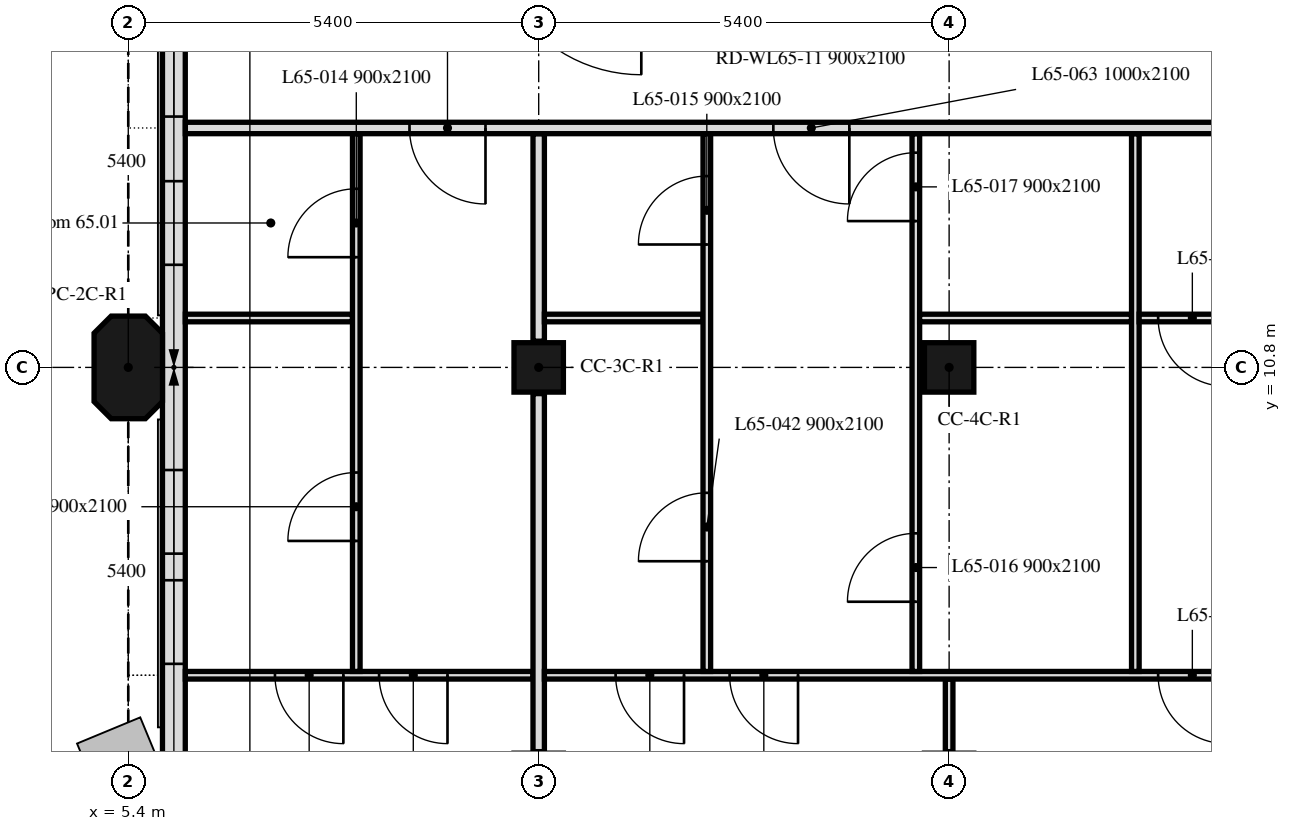
"""IFC4 building model, lengths in metres.
Left out: names, types, materials, properties, quantities, classifications, styles, units other than length and angle.
Written with IfcOpenShell. Run it as: python <this file> out.ifc"""

import sys

from ifc_helpers import new_model, si_unit, direction, frame, frame_2d, origin, origin_2d, place, context, subcontext, project, spatial, polyline, rectangle, outline, extrude, element, fill, save


model = new_model("IFC4")
c1 = context("Model", 3, precision=1e-05, world=origin(), true_north=direction((0.0, 1.0)))
c2 = subcontext(c1, "Body", "Model", "MODEL_VIEW")
j1 = project(units=[si_unit("LENGTHUNIT", "METRE"), si_unit("PLANEANGLEUNIT", "RADIAN")], contexts=[c1])
p1 = place(None, origin())
s1 = spatial("IfcSite", under=j1, at=p1, CompositionType="ELEMENT")
p2 = place(p1, origin())
s2 = spatial("IfcBuilding", under=s1, at=p2, CompositionType="ELEMENT")
p3 = place(p2, frame((0.0, 0.0, 268.6)))
s3 = spatial("IfcBuildingStorey", under=s2, at=p3, CompositionType="ELEMENT", Elevation=268.6)
p4 = place(p3, frame((5.4, 10.8, 0.0), z_axis=(0.0, 0.0, 1.0), x_axis=(0.0, 1.0, 0.0)))
e1 = element("IfcColumn", 1, at=p4, inside=s3, PredefinedType="COLUMN", context=c2, shape_type="SweptSolid", body=[
    extrude(outline(polyline([(-0.45, -0.45), (0.45, -0.45), (0.675, -0.225), (0.675, 0.225), (0.45, 0.45), (-0.45, 0.45), (-0.675, 0.225), (-0.675, -0.225), (-0.45, -0.45)])), origin(), (0.0, 0.0, 1.0), 3.0),
])
for number, where, z_axis, x_axis in (
    (2, (10.8, 10.8, 0.0), (0.0, 0.0, 1.0), (1.0, 0.0, 0.0)),
    (3, (16.2, 10.8, 0.0), (0.0, 0.0, 1.0), (1.0, 0.0, 0.0)),
):
    element("IfcColumn", number, at=place(p3, frame(where, z_axis=z_axis, x_axis=x_axis)), inside=s3, PredefinedType="COLUMN", context=c2, shape_type="SweptSolid", body=[
        extrude(rectangle(XDim=0.65, YDim=0.65, at=origin_2d()), origin(), (0.0, 0.0, 1.0), 3.0),
    ])
p5 = place(p3, frame((6.0, 16.2, 0.0), z_axis=(0.0, 0.0, 1.0), x_axis=(0.0, -1.0, 0.0)))
e4 = element("IfcWall", 4, at=p5, inside=s3, PredefinedType="SOLIDWALL", context=c2, shape_type="SweptSolid", body=[
    extrude(rectangle(XDim=10.614, YDim=0.3, at=frame_2d((5.307, 0.0))), origin(), (0.0, 0.0, 1.0), 3.0),
])
p6 = place(p5, frame((1.0, 0.0, 0.9)))
e5 = element("IfcOpeningElement", 5, at=p6, cuts=e4, PredefinedType="OPENING", context=c2, shape_type="SweptSolid", body=[
    extrude(rectangle(XDim=1.1, YDim=1.7, at=frame_2d((0.55, 0.85))), frame((0.0, 0.16, 0.0), z_axis=(0.0, -1.0, 0.0), x_axis=(1.0, 0.0, 0.0)), (0.0, 0.0, 1.0), 0.32),
])
p7 = place(p5, frame((2.95, 0.0, 0.9)))
e6 = element("IfcOpeningElement", 6, at=p7, cuts=e4, PredefinedType="OPENING", context=c2, shape_type="SweptSolid", body=[
    extrude(rectangle(XDim=1.1, YDim=1.7, at=frame_2d((0.55, 0.85))), frame((0.0, 0.16, 0.0), z_axis=(0.0, -1.0, 0.0), x_axis=(1.0, 0.0, 0.0)), (0.0, 0.0, 1.0), 0.32),
])
p8 = place(p5, frame((6.75, 0.0, 0.9)))
e7 = element("IfcOpeningElement", 7, at=p8, cuts=e4, PredefinedType="OPENING", context=c2, shape_type="SweptSolid", body=[
    extrude(rectangle(XDim=1.1, YDim=1.7, at=frame_2d((0.55, 0.85))), frame((0.0, 0.16, 0.0), z_axis=(0.0, -1.0, 0.0), x_axis=(1.0, 0.0, 0.0)), (0.0, 0.0, 1.0), 0.32),
])
p9 = place(p5, frame((8.2, 0.0, 0.9)))
e8 = element("IfcOpeningElement", 8, at=p9, cuts=e4, PredefinedType="OPENING", context=c2, shape_type="SweptSolid", body=[
    extrude(rectangle(XDim=1.1, YDim=1.7, at=frame_2d((0.55, 0.85))), frame((0.0, 0.16, 0.0), z_axis=(0.0, -1.0, 0.0), x_axis=(1.0, 0.0, 0.0)), (0.0, 0.0, 1.0), 0.32),
])
p10 = place(p3, frame((10.725, 6.75, 0.0), z_axis=(0.0, 0.0, 1.0), x_axis=(-1.0, 0.0, 0.0)))
e9 = element("IfcWall", 9, at=p10, inside=s3, PredefinedType="PARTITIONING", context=c2, shape_type="SweptSolid", body=[
    extrude(rectangle(XDim=4.574, YDim=0.1, at=frame_2d((2.287, 0.0))), origin(), (0.0, 0.0, 1.0), 3.0),
])
p11 = place(p10, frame((2.495, 0.0, 0.0)))
e10 = element("IfcOpeningElement", 10, at=p11, cuts=e9, PredefinedType="OPENING", context=c2, shape_type="SweptSolid", body=[
    extrude(rectangle(XDim=0.9, YDim=2.1, at=frame_2d((0.45, 1.05))), frame((0.0, 0.05, 0.0), z_axis=(0.0, -1.0, 0.0), x_axis=(1.0, 0.0, 0.0)), (0.0, 0.0, 1.0), 0.1),
])
p12 = place(p10, frame((1.125, 0.0, 0.0)))
e11 = element("IfcOpeningElement", 11, at=p12, cuts=e9, PredefinedType="OPENING", context=c2, shape_type="SweptSolid", body=[
    extrude(rectangle(XDim=0.9, YDim=2.1, at=frame_2d((0.45, 1.05))), frame((0.0, 0.05, 0.0), z_axis=(0.0, -1.0, 0.0), x_axis=(1.0, 0.0, 0.0)), (0.0, 0.0, 1.0), 0.1),
])
p13 = place(p3, frame((8.35, 11.45, 0.0), z_axis=(0.0, 0.0, 1.0), x_axis=(-1.0, 0.0, 0.0)))
e12 = element("IfcWall", 12, at=p13, inside=s3, PredefinedType="PARTITIONING", context=c2, shape_type="SweptSolid", body=[
    extrude(rectangle(XDim=2.199, YDim=0.1, at=frame_2d((1.1, 0.0))), origin(), (0.0, 0.0, 1.0), 3.0),
])
p14 = place(p3, frame((8.4, 6.8, 0.0), z_axis=(0.0, 0.0, 1.0), x_axis=(0.0, 1.0, 0.0)))
e13 = element("IfcWall", 13, at=p14, inside=s3, PredefinedType="PARTITIONING", context=c2, shape_type="SweptSolid", body=[
    extrude(rectangle(XDim=7.075, YDim=0.1, at=frame_2d((3.538, 0.0))), origin(), (0.0, 0.0, 1.0), 3.0),
])
p15 = place(p14, frame((5.45, 0.0, 0.0)))
e14 = element("IfcOpeningElement", 14, at=p15, cuts=e13, PredefinedType="OPENING", context=c2, shape_type="SweptSolid", body=[
    extrude(rectangle(XDim=0.9, YDim=2.1, at=frame_2d((0.45, 1.05))), frame((0.0, 0.05, 0.0), z_axis=(0.0, -1.0, 0.0), x_axis=(1.0, 0.0, 0.0)), (0.0, 0.0, 1.0), 0.1),
])
p16 = place(p14, frame((1.717, 0.0, 0.0)))
e15 = element("IfcOpeningElement", 15, at=p16, cuts=e13, PredefinedType="OPENING", context=c2, shape_type="SweptSolid", body=[
    extrude(rectangle(XDim=0.9, YDim=2.1, at=frame_2d((0.45, 1.05))), frame((0.0, 0.05, 0.0), z_axis=(0.0, -1.0, 0.0), x_axis=(1.0, 0.0, 0.0)), (0.0, 0.0, 1.0), 0.1),
])
p17 = place(p3, frame((10.8, 5.745, 0.0), z_axis=(0.0, 0.0, 1.0), x_axis=(0.0, 1.0, 0.0)))
e16 = element("IfcWall", 16, at=p17, inside=s3, PredefinedType="PARTITIONING", context=c2, shape_type="SweptSolid", body=[
    extrude(rectangle(XDim=4.71, YDim=0.15, at=frame_2d((2.355, 0.0))), origin(), (0.0, 0.0, 1.0), 3.0),
])
p18 = place(p3, frame((10.8, 11.145, 0.0), z_axis=(0.0, 0.0, 1.0), x_axis=(0.0, 1.0, 0.0)))
e17 = element("IfcWall", 17, at=p18, inside=s3, PredefinedType="PARTITIONING", context=c2, shape_type="SweptSolid", body=[
    extrude(rectangle(XDim=2.73, YDim=0.15, at=frame_2d((1.365, 0.0))), origin(), (0.0, 0.0, 1.0), 3.0),
])
p19 = place(p3, frame((16.2, 5.745, 0.0), z_axis=(0.0, 0.0, 1.0), x_axis=(0.0, 1.0, 0.0)))
e18 = element("IfcWall", 18, at=p19, inside=s3, PredefinedType="PARTITIONING", context=c2, shape_type="SweptSolid", body=[
    extrude(rectangle(XDim=0.955, YDim=0.1, at=frame_2d((0.478, 0.0))), origin(), (0.0, 0.0, 1.0), 2.4),
])
p20 = place(p3, frame((21.525, 6.75, 0.0), z_axis=(0.0, 0.0, 1.0), x_axis=(-1.0, 0.0, 0.0)))
e19 = element("IfcWall", 19, at=p20, inside=s3, PredefinedType="PARTITIONING", context=c2, shape_type="SweptSolid", body=[
    extrude(rectangle(XDim=10.65, YDim=0.1, at=frame_2d((5.325, 0.0))), origin(), (0.0, 0.0, 1.0), 2.4),
])
p21 = place(p20, frame((8.813, 0.0, 0.0)))
e20 = element("IfcOpeningElement", 20, at=p21, cuts=e19, PredefinedType="OPENING", context=c2, shape_type="SweptSolid", body=[
    extrude(rectangle(XDim=0.9, YDim=2.1, at=frame_2d((0.45, 1.05))), frame((0.0, 0.05, 0.0), z_axis=(0.0, -1.0, 0.0), x_axis=(1.0, 0.0, 0.0)), (0.0, 0.0, 1.0), 0.1),
])
p22 = place(p20, frame((1.675, 0.0, 0.0)))
e21 = element("IfcOpeningElement", 21, at=p22, cuts=e19, PredefinedType="OPENING", context=c2, shape_type="SweptSolid", body=[
    extrude(rectangle(XDim=0.9, YDim=2.1, at=frame_2d((0.45, 1.05))), frame((0.0, 0.05, 0.0), z_axis=(0.0, -1.0, 0.0), x_axis=(1.0, 0.0, 0.0)), (0.0, 0.0, 1.0), 0.1),
])
p23 = place(p20, frame((7.313, 0.0, 0.0)))
e22 = element("IfcOpeningElement", 22, at=p23, cuts=e19, PredefinedType="OPENING", context=c2, shape_type="SweptSolid", body=[
    extrude(rectangle(XDim=0.9, YDim=2.1, at=frame_2d((0.45, 1.05))), frame((0.0, 0.05, 0.0), z_axis=(0.0, -1.0, 0.0), x_axis=(1.0, 0.0, 0.0)), (0.0, 0.0, 1.0), 0.1),
])
p24 = place(p3, frame((12.962, 11.45, 0.0), z_axis=(0.0, 0.0, 1.0), x_axis=(-1.0, 0.0, 0.0)))
e23 = element("IfcWall", 23, at=p24, inside=s3, PredefinedType="PARTITIONING", context=c2, shape_type="SweptSolid", body=[
    extrude(rectangle(XDim=2.087, YDim=0.1, at=frame_2d((1.043, 0.0))), origin(), (0.0, 0.0, 1.0), 3.0),
])
p25 = place(p3, frame((13.012, 6.8, 0.0), z_axis=(0.0, 0.0, 1.0), x_axis=(0.0, 1.0, 0.0)))
e24 = element("IfcWall", 24, at=p25, inside=s3, PredefinedType="PARTITIONING", context=c2, shape_type="SweptSolid", body=[
    extrude(rectangle(XDim=7.075, YDim=0.1, at=frame_2d((3.538, 0.0))), origin(), (0.0, 0.0, 1.0), 3.0),
])
p26 = place(p25, frame((5.617, 0.0, 0.0)))
e25 = element("IfcOpeningElement", 25, at=p26, cuts=e24, PredefinedType="OPENING", context=c2, shape_type="SweptSolid", body=[
    extrude(rectangle(XDim=0.9, YDim=2.1, at=frame_2d((0.45, 1.05))), frame((0.0, 0.05, 0.0), z_axis=(0.0, -1.0, 0.0), x_axis=(1.0, 0.0, 0.0)), (0.0, 0.0, 1.0), 0.1),
])
p27 = place(p25, frame((1.45, 0.0, 0.0)))
e26 = element("IfcOpeningElement", 26, at=p27, cuts=e24, PredefinedType="OPENING", context=c2, shape_type="SweptSolid", body=[
    extrude(rectangle(XDim=0.9, YDim=2.1, at=frame_2d((0.45, 1.05))), frame((0.0, 0.05, 0.0), z_axis=(0.0, -1.0, 0.0), x_axis=(1.0, 0.0, 0.0)), (0.0, 0.0, 1.0), 0.1),
])
p28 = place(p3, frame((15.762, 6.8, 0.0), z_axis=(0.0, 0.0, 1.0), x_axis=(0.0, 1.0, 0.0)))
e27 = element("IfcWall", 27, at=p28, inside=s3, PredefinedType="PARTITIONING", context=c2, shape_type="SweptSolid", body=[
    extrude(rectangle(XDim=7.075, YDim=0.1, at=frame_2d((3.538, 0.0))), origin(), (0.0, 0.0, 1.0), 3.0),
])
p29 = place(p28, frame((0.917, 0.0, 0.0)))
e28 = element("IfcOpeningElement", 28, at=p29, cuts=e27, PredefinedType="OPENING", context=c2, shape_type="SweptSolid", body=[
    extrude(rectangle(XDim=0.9, YDim=2.1, at=frame_2d((0.45, 1.05))), frame((0.0, 0.05, 0.0), z_axis=(0.0, -1.0, 0.0), x_axis=(1.0, 0.0, 0.0)), (0.0, 0.0, 1.0), 0.1),
])
p30 = place(p28, frame((5.925, 0.0, 0.0)))
e29 = element("IfcOpeningElement", 29, at=p30, cuts=e27, PredefinedType="OPENING", context=c2, shape_type="SweptSolid", body=[
    extrude(rectangle(XDim=0.9, YDim=2.1, at=frame_2d((0.45, 1.05))), frame((0.0, 0.05, 0.0), z_axis=(0.0, -1.0, 0.0), x_axis=(1.0, 0.0, 0.0)), (0.0, 0.0, 1.0), 0.1),
])
p31 = place(p3, frame((18.6, 11.45, 0.0), z_axis=(0.0, 0.0, 1.0), x_axis=(-1.0, 0.0, 0.0)))
e30 = element("IfcWall", 30, at=p31, inside=s3, PredefinedType="PARTITIONING", context=c2, shape_type="SweptSolid", body=[
    extrude(rectangle(XDim=2.788, YDim=0.1, at=frame_2d((1.394, 0.0))), origin(), (0.0, 0.0, 1.0), 2.4),
])
p32 = place(p3, frame((18.65, 6.8, 0.0), z_axis=(0.0, 0.0, 1.0), x_axis=(0.0, 1.0, 0.0)))
e31 = element("IfcWall", 31, at=p32, inside=s3, PredefinedType="PARTITIONING", context=c2, shape_type="SweptSolid", body=[
    extrude(rectangle(XDim=7.075, YDim=0.1, at=frame_2d((3.538, 0.0))), origin(), (0.0, 0.0, 1.0), 3.0),
])
p33 = place(p3, frame((21.525, 11.45, 0.0), z_axis=(0.0, 0.0, 1.0), x_axis=(-1.0, 0.0, 0.0)))
e32 = element("IfcWall", 32, at=p33, inside=s3, PredefinedType="PARTITIONING", context=c2, shape_type="SweptSolid", body=[
    extrude(rectangle(XDim=2.825, YDim=0.1, at=frame_2d((1.413, 0.0))), origin(), (0.0, 0.0, 1.0), 3.0),
])
p34 = place(p33, frame((1.675, 0.0, 0.0)))
e33 = element("IfcOpeningElement", 33, at=p34, cuts=e32, PredefinedType="OPENING", context=c2, shape_type="SweptSolid", body=[
    extrude(rectangle(XDim=0.9, YDim=2.1, at=frame_2d((0.45, 1.05))), frame((0.0, 0.05, 0.0), z_axis=(0.0, -1.0, 0.0), x_axis=(1.0, 0.0, 0.0)), (0.0, 0.0, 1.0), 0.1),
])
p35 = place(p3, frame((47.849, 13.95, 0.0), z_axis=(0.0, 0.0, 1.0), x_axis=(-1.0, 0.0, 0.0)))
e34 = element("IfcWall", 34, at=p35, inside=s3, PredefinedType="PARTITIONING", context=c2, shape_type="SweptSolid", body=[
    extrude(rectangle(XDim=41.698, YDim=0.15, at=frame_2d((20.849, 0.0))), origin(), (0.0, 0.0, 1.0), 2.4),
])
p36 = place(p35, frame((37.749, 0.0, 0.0)))
e35 = element("IfcOpeningElement", 35, at=p36, cuts=e34, PredefinedType="OPENING", context=c2, shape_type="SweptSolid", body=[
    extrude(rectangle(XDim=1.0, YDim=2.1, at=frame_2d((0.5, 1.05))), frame((0.0, 0.075, 0.0), z_axis=(0.0, -1.0, 0.0), x_axis=(1.0, 0.0, 0.0)), (0.0, 0.0, 1.0), 0.15),
])
p37 = place(p35, frame((32.962, 0.0, 0.0)))
e36 = element("IfcOpeningElement", 36, at=p37, cuts=e34, PredefinedType="OPENING", context=c2, shape_type="SweptSolid", body=[
    extrude(rectangle(XDim=1.0, YDim=2.1, at=frame_2d((0.5, 1.05))), frame((0.0, 0.075, 0.0), z_axis=(0.0, -1.0, 0.0), x_axis=(1.0, 0.0, 0.0)), (0.0, 0.0, 1.0), 0.15),
])
p38 = place(p35, frame((22.179, 0.0, 0.0)))
e37 = element("IfcOpeningElement", 37, at=p38, cuts=e34, PredefinedType="OPENING", context=c2, shape_type="SweptSolid", body=[
    extrude(rectangle(XDim=1.0, YDim=2.1, at=frame_2d((0.5, 1.05))), frame((0.0, 0.075, 0.0), z_axis=(0.0, -1.0, 0.0), x_axis=(1.0, 0.0, 0.0)), (0.0, 0.0, 1.0), 0.15),
])
p39 = place(p35, frame((9.193, 0.0, 0.0)))
e38 = element("IfcOpeningElement", 38, at=p39, cuts=e34, PredefinedType="OPENING", context=c2, shape_type="SweptSolid", body=[
    extrude(rectangle(XDim=1.0, YDim=2.1, at=frame_2d((0.5, 1.05))), frame((0.0, 0.075, 0.0), z_axis=(0.0, -1.0, 0.0), x_axis=(1.0, 0.0, 0.0)), (0.0, 0.0, 1.0), 0.15),
])
p40 = place(p6, origin())
e39 = element("IfcWindow", 39, at=p40, inside=s3, PartitioningType="SINGLE_PANEL", PredefinedType="WINDOW", context=c2, shape_type="SweptSolid", body=[
    extrude(rectangle(XDim=1.1, YDim=1.7, at=frame_2d((0.55, 0.85))), frame((0.0, 0.03, 0.0), z_axis=(0.0, -1.0, 0.0), x_axis=(1.0, 0.0, 0.0)), (0.0, 0.0, 1.0), 0.06),
])
fill(e5, e39)
p41 = place(p7, origin())
e40 = element("IfcWindow", 40, at=p41, inside=s3, PartitioningType="SINGLE_PANEL", PredefinedType="WINDOW", context=c2, shape_type="SweptSolid", body=[
    extrude(rectangle(XDim=1.1, YDim=1.7, at=frame_2d((0.55, 0.85))), frame((0.0, 0.03, 0.0), z_axis=(0.0, -1.0, 0.0), x_axis=(1.0, 0.0, 0.0)), (0.0, 0.0, 1.0), 0.06),
])
fill(e6, e40)
p42 = place(p8, origin())
e41 = element("IfcWindow", 41, at=p42, inside=s3, PartitioningType="SINGLE_PANEL", PredefinedType="WINDOW", context=c2, shape_type="SweptSolid", body=[
    extrude(rectangle(XDim=1.1, YDim=1.7, at=frame_2d((0.55, 0.85))), frame((0.0, 0.03, 0.0), z_axis=(0.0, -1.0, 0.0), x_axis=(1.0, 0.0, 0.0)), (0.0, 0.0, 1.0), 0.06),
])
fill(e7, e41)
p43 = place(p9, origin())
e42 = element("IfcWindow", 42, at=p43, inside=s3, PartitioningType="SINGLE_PANEL", PredefinedType="WINDOW", context=c2, shape_type="SweptSolid", body=[
    extrude(rectangle(XDim=1.1, YDim=1.7, at=frame_2d((0.55, 0.85))), frame((0.0, 0.03, 0.0), z_axis=(0.0, -1.0, 0.0), x_axis=(1.0, 0.0, 0.0)), (0.0, 0.0, 1.0), 0.06),
])
fill(e8, e42)
p44 = place(p15, origin())
e43 = element("IfcDoor", 43, at=p44, inside=s3, OperationType="SINGLE_SWING_RIGHT", PredefinedType="DOOR", context=c2, shape_type="SweptSolid", body=[
    extrude(rectangle(XDim=0.9, YDim=2.1, at=frame_2d((0.45, 1.05))), frame((0.0, 0.025, 0.0), z_axis=(0.0, -1.0, 0.0), x_axis=(1.0, 0.0, 0.0)), (0.0, 0.0, 1.0), 0.05),
])
fill(e14, e43)
p45 = place(p26, origin())
e44 = element("IfcDoor", 44, at=p45, inside=s3, OperationType="SINGLE_SWING_LEFT", PredefinedType="DOOR", context=c2, shape_type="SweptSolid", body=[
    extrude(rectangle(XDim=0.9, YDim=2.1, at=frame_2d((0.45, 1.05))), frame((0.0, 0.025, 0.0), z_axis=(0.0, -1.0, 0.0), x_axis=(1.0, 0.0, 0.0)), (0.0, 0.0, 1.0), 0.05),
])
fill(e25, e44)
p46 = place(p29, origin())
e45 = element("IfcDoor", 45, at=p46, inside=s3, OperationType="SINGLE_SWING_RIGHT", PredefinedType="DOOR", context=c2, shape_type="SweptSolid", body=[
    extrude(rectangle(XDim=0.9, YDim=2.1, at=frame_2d((0.45, 1.05))), frame((0.0, 0.025, 0.0), z_axis=(0.0, -1.0, 0.0), x_axis=(1.0, 0.0, 0.0)), (0.0, 0.0, 1.0), 0.05),
])
fill(e28, e45)
p47 = place(p30, origin())
e46 = element("IfcDoor", 46, at=p47, inside=s3, OperationType="SINGLE_SWING_RIGHT", PredefinedType="DOOR", context=c2, shape_type="SweptSolid", body=[
    extrude(rectangle(XDim=0.9, YDim=2.1, at=frame_2d((0.45, 1.05))), frame((0.0, 0.025, 0.0), z_axis=(0.0, -1.0, 0.0), x_axis=(1.0, 0.0, 0.0)), (0.0, 0.0, 1.0), 0.05),
])
fill(e29, e46)
p48 = place(p34, origin())
e47 = element("IfcDoor", 47, at=p48, inside=s3, OperationType="SINGLE_SWING_RIGHT", PredefinedType="DOOR", context=c2, shape_type="SweptSolid", body=[
    extrude(rectangle(XDim=0.9, YDim=2.1, at=frame_2d((0.45, 1.05))), frame((0.0, 0.025, 0.0), z_axis=(0.0, -1.0, 0.0), x_axis=(1.0, 0.0, 0.0)), (0.0, 0.0, 1.0), 0.05),
])
fill(e33, e47)
p49 = place(p11, origin())
e48 = element("IfcDoor", 48, at=p49, inside=s3, OperationType="SINGLE_SWING_LEFT", PredefinedType="DOOR", context=c2, shape_type="SweptSolid", body=[
    extrude(rectangle(XDim=0.9, YDim=2.1, at=frame_2d((0.45, 1.05))), frame((0.0, 0.025, 0.0), z_axis=(0.0, -1.0, 0.0), x_axis=(1.0, 0.0, 0.0)), (0.0, 0.0, 1.0), 0.05),
])
fill(e10, e48)
p50 = place(p12, origin())
e49 = element("IfcDoor", 49, at=p50, inside=s3, OperationType="SINGLE_SWING_RIGHT", PredefinedType="DOOR", context=c2, shape_type="SweptSolid", body=[
    extrude(rectangle(XDim=0.9, YDim=2.1, at=frame_2d((0.45, 1.05))), frame((0.0, 0.025, 0.0), z_axis=(0.0, -1.0, 0.0), x_axis=(1.0, 0.0, 0.0)), (0.0, 0.0, 1.0), 0.05),
])
fill(e11, e49)
p51 = place(p16, origin())
e50 = element("IfcDoor", 50, at=p51, inside=s3, OperationType="SINGLE_SWING_LEFT", PredefinedType="DOOR", context=c2, shape_type="SweptSolid", body=[
    extrude(rectangle(XDim=0.9, YDim=2.1, at=frame_2d((0.45, 1.05))), frame((0.0, 0.025, 0.0), z_axis=(0.0, -1.0, 0.0), x_axis=(1.0, 0.0, 0.0)), (0.0, 0.0, 1.0), 0.05),
])
fill(e15, e50)
p52 = place(p21, origin())
e51 = element("IfcDoor", 51, at=p52, inside=s3, OperationType="SINGLE_SWING_LEFT", PredefinedType="DOOR", context=c2, shape_type="SweptSolid", body=[
    extrude(rectangle(XDim=0.9, YDim=2.1, at=frame_2d((0.45, 1.05))), frame((0.0, 0.025, 0.0), z_axis=(0.0, -1.0, 0.0), x_axis=(1.0, 0.0, 0.0)), (0.0, 0.0, 1.0), 0.05),
])
fill(e20, e51)
p53 = place(p22, origin())
e52 = element("IfcDoor", 52, at=p53, inside=s3, OperationType="SINGLE_SWING_RIGHT", PredefinedType="DOOR", context=c2, shape_type="SweptSolid", body=[
    extrude(rectangle(XDim=0.9, YDim=2.1, at=frame_2d((0.45, 1.05))), frame((0.0, 0.025, 0.0), z_axis=(0.0, -1.0, 0.0), x_axis=(1.0, 0.0, 0.0)), (0.0, 0.0, 1.0), 0.05),
])
fill(e21, e52)
p54 = place(p27, origin())
e53 = element("IfcDoor", 53, at=p54, inside=s3, OperationType="SINGLE_SWING_RIGHT", PredefinedType="DOOR", context=c2, shape_type="SweptSolid", body=[
    extrude(rectangle(XDim=0.9, YDim=2.1, at=frame_2d((0.45, 1.05))), frame((0.0, 0.025, 0.0), z_axis=(0.0, -1.0, 0.0), x_axis=(1.0, 0.0, 0.0)), (0.0, 0.0, 1.0), 0.05),
])
fill(e26, e53)
p55 = place(p23, origin())
e54 = element("IfcDoor", 54, at=p55, inside=s3, OperationType="SINGLE_SWING_RIGHT", PredefinedType="DOOR", context=c2, shape_type="SweptSolid", body=[
    extrude(rectangle(XDim=0.9, YDim=2.1, at=frame_2d((0.45, 1.05))), frame((0.0, 0.025, 0.0), z_axis=(0.0, -1.0, 0.0), x_axis=(1.0, 0.0, 0.0)), (0.0, 0.0, 1.0), 0.05),
])
fill(e22, e54)
p56 = place(p36, origin())
e55 = element("IfcDoor", 55, at=p56, inside=s3, OperationType="SINGLE_SWING_LEFT", PredefinedType="DOOR", context=c2, shape_type="SweptSolid", body=[
    extrude(rectangle(XDim=1.0, YDim=2.1, at=frame_2d((0.5, 1.05))), frame((0.0, 0.025, 0.0), z_axis=(0.0, -1.0, 0.0), x_axis=(1.0, 0.0, 0.0)), (0.0, 0.0, 1.0), 0.05),
])
fill(e35, e55)
p57 = place(p37, origin())
e56 = element("IfcDoor", 56, at=p57, inside=s3, OperationType="SINGLE_SWING_LEFT", PredefinedType="DOOR", context=c2, shape_type="SweptSolid", body=[
    extrude(rectangle(XDim=1.0, YDim=2.1, at=frame_2d((0.5, 1.05))), frame((0.0, 0.025, 0.0), z_axis=(0.0, -1.0, 0.0), x_axis=(1.0, 0.0, 0.0)), (0.0, 0.0, 1.0), 0.05),
])
fill(e36, e56)
save(model, sys.argv[1])
